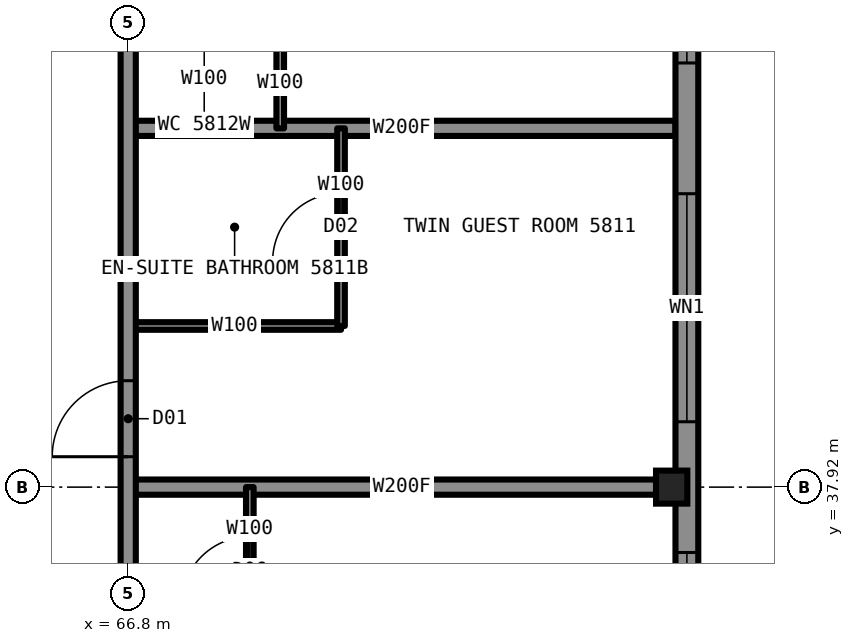
"""IFC4 building model, lengths in metres.
Left out: names, types, materials, properties, quantities, classifications, styles, units other than length and angle.
Written with IfcOpenShell. Run it as: python <this file> out.ifc"""

import sys

from ifc_helpers import new_model, si_unit, direction, frame, frame_2d, origin, origin_2d, place, context, subcontext, project, spatial, rectangle, i_section, extrude, element, fill, save


model = new_model("IFC4")
c1 = context("Model", 3, precision=1e-05, world=origin(), true_north=direction((0.0, 1.0)))
c2 = subcontext(c1, "Body", "Model", "MODEL_VIEW")
j1 = project(units=[si_unit("LENGTHUNIT", "METRE"), si_unit("PLANEANGLEUNIT", "RADIAN")], contexts=[c1])
p1 = place(None, origin())
s1 = spatial("IfcSite", under=j1, at=p1, CompositionType="ELEMENT")
p2 = place(p1, origin())
s2 = spatial("IfcBuilding", under=s1, at=p2, CompositionType="ELEMENT")
p3 = place(p2, frame((0.0, 0.0, 214.3)))
s3 = spatial("IfcBuildingStorey", under=s2, at=p3, CompositionType="ELEMENT", Elevation=214.3)
p4 = place(p3, frame((73.95, 37.92, 0.0), z_axis=(0.0, 0.0, 1.0), x_axis=(1.0, 0.0, 0.0)))
e1 = element("IfcColumn", 1, at=p4, inside=s3, PredefinedType="COLUMN", context=c2, shape_type="SweptSolid", body=[
    extrude(i_section(OverallWidth=0.411, OverallDepth=0.434, WebThickness=0.036, FlangeThickness=0.057, at=origin_2d()), origin(), (0.0, 0.0, 1.0), 3.5),
])
p5 = place(p3, frame((66.8, 42.64, 0.0), z_axis=(0.0, 0.0, 1.0), x_axis=(1.0, 0.0, 0.0)))
e2 = element("IfcWall", 2, at=p5, inside=s3, PredefinedType="PARTITIONING", context=c2, shape_type="SweptSolid", body=[
    extrude(rectangle(XDim=7.2, YDim=0.2, at=frame_2d((3.6, 0.0))), origin(), (0.0, 0.0, 1.0), 2.73),
])
p6 = place(p3, frame((66.8, 40.04, 0.0), z_axis=(0.0, 0.0, 1.0), x_axis=(1.0, 0.0, 0.0)))
e3 = element("IfcWall", 3, at=p6, inside=s3, PredefinedType="PARTITIONING", context=c2, shape_type="SweptSolid", body=[
    extrude(rectangle(XDim=2.8, YDim=0.1, at=frame_2d((1.4, 0.0))), origin(), (0.0, 0.0, 1.0), 3.33),
])
p7 = place(p3, frame((66.8, 37.92, 0.0), z_axis=(0.0, 0.0, 1.0), x_axis=(1.0, 0.0, 0.0)))
e4 = element("IfcWall", 4, at=p7, inside=s3, PredefinedType="PARTITIONING", context=c2, shape_type="SweptSolid", body=[
    extrude(rectangle(XDim=7.2, YDim=0.2, at=frame_2d((3.6, 0.0))), origin(), (0.0, 0.0, 1.0), 2.573),
])
p8 = place(p3, frame((66.8, 33.2, 0.0), z_axis=(0.0, 0.0, 1.0), x_axis=(0.0, 1.0, 0.0)))
e5 = element("IfcWall", 5, at=p8, inside=s3, PredefinedType="PARTITIONING", context=c2, shape_type="SweptSolid", body=[
    extrude(rectangle(XDim=23.58, YDim=0.2, at=frame_2d((11.79, 0.0))), origin(), (0.0, 0.0, 1.0), 3.33),
])
p9 = place(p8, frame((5.12, 0.0, 0.0)))
e6 = element("IfcOpeningElement", 6, at=p9, cuts=e5, PredefinedType="OPENING", context=c2, shape_type="SweptSolid", body=[
    extrude(rectangle(XDim=1.0, YDim=2.2, at=frame_2d((0.5, 1.1))), frame((0.0, 0.11, 0.0), z_axis=(0.0, -1.0, 0.0), x_axis=(1.0, 0.0, 0.0)), (0.0, 0.0, 1.0), 0.22),
])
p10 = place(p8, frame((10.9, 0.0, 0.0)))
e7 = element("IfcOpeningElement", 7, at=p10, cuts=e5, PredefinedType="OPENING", context=c2, shape_type="SweptSolid", body=[
    extrude(rectangle(XDim=1.0, YDim=2.2, at=frame_2d((0.5, 1.1))), frame((0.0, 0.11, 0.0), z_axis=(0.0, -1.0, 0.0), x_axis=(1.0, 0.0, 0.0)), (0.0, 0.0, 1.0), 0.22),
])
p11 = place(p8, frame((17.31, 0.0, 0.0)))
e8 = element("IfcOpeningElement", 8, at=p11, cuts=e5, PredefinedType="OPENING", context=c2, shape_type="SweptSolid", body=[
    extrude(rectangle(XDim=1.0, YDim=2.2, at=frame_2d((0.5, 1.1))), frame((0.0, 0.11, 0.0), z_axis=(0.0, -1.0, 0.0), x_axis=(1.0, 0.0, 0.0)), (0.0, 0.0, 1.0), 0.22),
])
p12 = place(p8, frame((22.05, 0.0, 0.0)))
e9 = element("IfcOpeningElement", 9, at=p12, cuts=e5, PredefinedType="OPENING", context=c2, shape_type="SweptSolid", body=[
    extrude(rectangle(XDim=1.1, YDim=2.2, at=frame_2d((0.55, 1.1))), frame((0.0, 0.11, 0.0), z_axis=(0.0, -1.0, 0.0), x_axis=(1.0, 0.0, 0.0)), (0.0, 0.0, 1.0), 0.22),
])
p13 = place(p8, frame((0.65, 0.0, 0.0)))
e10 = element("IfcOpeningElement", 10, at=p13, cuts=e5, PredefinedType="OPENING", context=c2, shape_type="SweptSolid", body=[
    extrude(rectangle(XDim=1.1, YDim=2.2, at=frame_2d((0.55, 1.1))), frame((0.0, 0.11, 0.0), z_axis=(0.0, -1.0, 0.0), x_axis=(1.0, 0.0, 0.0)), (0.0, 0.0, 1.0), 0.22),
])
p14 = place(p3, frame((68.4, 35.72, 0.0), z_axis=(0.0, 0.0, 1.0), x_axis=(0.0, 1.0, 0.0)))
e11 = element("IfcWall", 11, at=p14, inside=s3, PredefinedType="PARTITIONING", context=c2, shape_type="SweptSolid", body=[
    extrude(rectangle(XDim=2.2, YDim=0.1, at=frame_2d((1.1, 0.0))), origin(), (0.0, 0.0, 1.0), 3.33),
])
p15 = place(p14, frame((0.65, 0.0, 0.0)))
e12 = element("IfcOpeningElement", 12, at=p15, cuts=e11, PredefinedType="OPENING", context=c2, shape_type="SweptSolid", body=[
    extrude(rectangle(XDim=0.9, YDim=2.1, at=frame_2d((0.45, 1.05))), frame((0.0, 0.06, 0.0), z_axis=(0.0, -1.0, 0.0), x_axis=(1.0, 0.0, 0.0)), (0.0, 0.0, 1.0), 0.12),
])
p16 = place(p3, frame((68.8, 42.64, 0.0), z_axis=(0.0, 0.0, 1.0), x_axis=(0.0, 1.0, 0.0)))
e13 = element("IfcWall", 13, at=p16, inside=s3, PredefinedType="PARTITIONING", context=c2, shape_type="SweptSolid", body=[
    extrude(rectangle(XDim=1.2, YDim=0.1, at=frame_2d((0.6, 0.0))), origin(), (0.0, 0.0, 1.0), 3.33),
])
p17 = place(p3, frame((69.6, 40.04, 0.0), z_axis=(0.0, 0.0, 1.0), x_axis=(0.0, 1.0, 0.0)))
e14 = element("IfcWall", 14, at=p17, inside=s3, PredefinedType="PARTITIONING", context=c2, shape_type="SweptSolid", body=[
    extrude(rectangle(XDim=2.6, YDim=0.1, at=frame_2d((1.3, 0.0))), origin(), (0.0, 0.0, 1.0), 3.33),
])
p18 = place(p17, frame((0.85, 0.0, 0.0)))
e15 = element("IfcOpeningElement", 15, at=p18, cuts=e14, PredefinedType="OPENING", context=c2, shape_type="SweptSolid", body=[
    extrude(rectangle(XDim=0.9, YDim=2.1, at=frame_2d((0.45, 1.05))), frame((0.0, 0.06, 0.0), z_axis=(0.0, -1.0, 0.0), x_axis=(1.0, 0.0, 0.0)), (0.0, 0.0, 1.0), 0.12),
])
p19 = place(p3, frame((74.15, 31.2, 0.0), z_axis=(0.0, 0.0, 1.0), x_axis=(0.0, 1.0, 0.0)))
e16 = element("IfcWall", 16, at=p19, inside=s3, PredefinedType="SOLIDWALL", context=c2, shape_type="SweptSolid", body=[
    extrude(rectangle(XDim=27.6, YDim=0.3, at=frame_2d((13.8, 0.0))), origin(), (0.0, 0.0, 1.0), 2.63),
])
p20 = place(p19, frame((2.86, 0.0, 0.3)))
e17 = element("IfcOpeningElement", 17, at=p20, cuts=e16, PredefinedType="OPENING", context=c2, shape_type="SweptSolid", body=[
    extrude(rectangle(XDim=3.0, YDim=2.0, at=frame_2d((1.5, 1.0))), frame((0.0, 0.16, 0.0), z_axis=(0.0, -1.0, 0.0), x_axis=(1.0, 0.0, 0.0)), (0.0, 0.0, 1.0), 0.32),
])
p21 = place(p19, frame((7.58, 0.0, 0.3)))
e18 = element("IfcOpeningElement", 18, at=p21, cuts=e16, PredefinedType="OPENING", context=c2, shape_type="SweptSolid", body=[
    extrude(rectangle(XDim=3.0, YDim=2.0, at=frame_2d((1.5, 1.0))), frame((0.0, 0.16, 0.0), z_axis=(0.0, -1.0, 0.0), x_axis=(1.0, 0.0, 0.0)), (0.0, 0.0, 1.0), 0.32),
])
p22 = place(p19, frame((12.3, 0.0, 0.3)))
e19 = element("IfcOpeningElement", 19, at=p22, cuts=e16, PredefinedType="OPENING", context=c2, shape_type="SweptSolid", body=[
    extrude(rectangle(XDim=3.0, YDim=2.0, at=frame_2d((1.5, 1.0))), frame((0.0, 0.16, 0.0), z_axis=(0.0, -1.0, 0.0), x_axis=(1.0, 0.0, 0.0)), (0.0, 0.0, 1.0), 0.32),
])
p23 = place(p19, frame((17.02, 0.0, 0.3)))
e20 = element("IfcOpeningElement", 20, at=p23, cuts=e16, PredefinedType="OPENING", context=c2, shape_type="SweptSolid", body=[
    extrude(rectangle(XDim=3.0, YDim=2.0, at=frame_2d((1.5, 1.0))), frame((0.0, 0.16, 0.0), z_axis=(0.0, -1.0, 0.0), x_axis=(1.0, 0.0, 0.0)), (0.0, 0.0, 1.0), 0.32),
])
p24 = place(p19, frame((21.74, 0.0, 0.3)))
e21 = element("IfcOpeningElement", 21, at=p24, cuts=e16, PredefinedType="OPENING", context=c2, shape_type="SweptSolid", body=[
    extrude(rectangle(XDim=3.0, YDim=2.0, at=frame_2d((1.5, 1.0))), frame((0.0, 0.16, 0.0), z_axis=(0.0, -1.0, 0.0), x_axis=(1.0, 0.0, 0.0)), (0.0, 0.0, 1.0), 0.32),
])
p25 = place(p9, origin())
e22 = element("IfcDoor", 22, at=p25, inside=s3, OperationType="SINGLE_SWING_LEFT", PredefinedType="DOOR", context=c2, shape_type="SweptSolid", body=[
    extrude(rectangle(XDim=1.0, YDim=2.2, at=frame_2d((0.5, 1.1))), frame((0.0, 0.025, 0.0), z_axis=(0.0, -1.0, 0.0), x_axis=(1.0, 0.0, 0.0)), (0.0, 0.0, 1.0), 0.05),
])
fill(e6, e22)
p26 = place(p18, origin())
e23 = element("IfcDoor", 23, at=p26, inside=s3, OperationType="SINGLE_SWING_RIGHT", PredefinedType="DOOR", context=c2, shape_type="SweptSolid", body=[
    extrude(rectangle(XDim=0.9, YDim=2.1, at=frame_2d((0.45, 1.05))), frame((0.0, 0.025, 0.0), z_axis=(0.0, -1.0, 0.0), x_axis=(1.0, 0.0, 0.0)), (0.0, 0.0, 1.0), 0.05),
])
fill(e15, e23)
p27 = place(p15, origin())
e24 = element("IfcDoor", 24, at=p27, inside=s3, OperationType="SINGLE_SWING_LEFT", PredefinedType="DOOR", context=c2, shape_type="SweptSolid", body=[
    extrude(rectangle(XDim=0.9, YDim=2.1, at=frame_2d((0.45, 1.05))), frame((0.0, 0.025, 0.0), z_axis=(0.0, -1.0, 0.0), x_axis=(1.0, 0.0, 0.0)), (0.0, 0.0, 1.0), 0.05),
])
fill(e12, e24)
p28 = place(p20, origin())
e25 = element("IfcWindow", 25, at=p28, inside=s3, PartitioningType="SINGLE_PANEL", PredefinedType="WINDOW", context=c2, shape_type="SweptSolid", body=[
    extrude(rectangle(XDim=3.0, YDim=2.0, at=frame_2d((1.5, 1.0))), frame((0.0, 0.13, 0.0), z_axis=(0.0, -1.0, 0.0), x_axis=(1.0, 0.0, 0.0)), (0.0, 0.0, 1.0), 0.06),
])
fill(e17, e25)
p29 = place(p21, origin())
e26 = element("IfcWindow", 26, at=p29, inside=s3, PartitioningType="SINGLE_PANEL", PredefinedType="WINDOW", context=c2, shape_type="SweptSolid", body=[
    extrude(rectangle(XDim=3.0, YDim=2.0, at=frame_2d((1.5, 1.0))), frame((0.0, 0.13, 0.0), z_axis=(0.0, -1.0, 0.0), x_axis=(1.0, 0.0, 0.0)), (0.0, 0.0, 1.0), 0.06),
])
fill(e18, e26)
p30 = place(p22, origin())
e27 = element("IfcWindow", 27, at=p30, inside=s3, PartitioningType="SINGLE_PANEL", PredefinedType="WINDOW", context=c2, shape_type="SweptSolid", body=[
    extrude(rectangle(XDim=3.0, YDim=2.0, at=frame_2d((1.5, 1.0))), frame((0.0, 0.13, 0.0), z_axis=(0.0, -1.0, 0.0), x_axis=(1.0, 0.0, 0.0)), (0.0, 0.0, 1.0), 0.06),
])
fill(e19, e27)
save(model, sys.argv[1])
